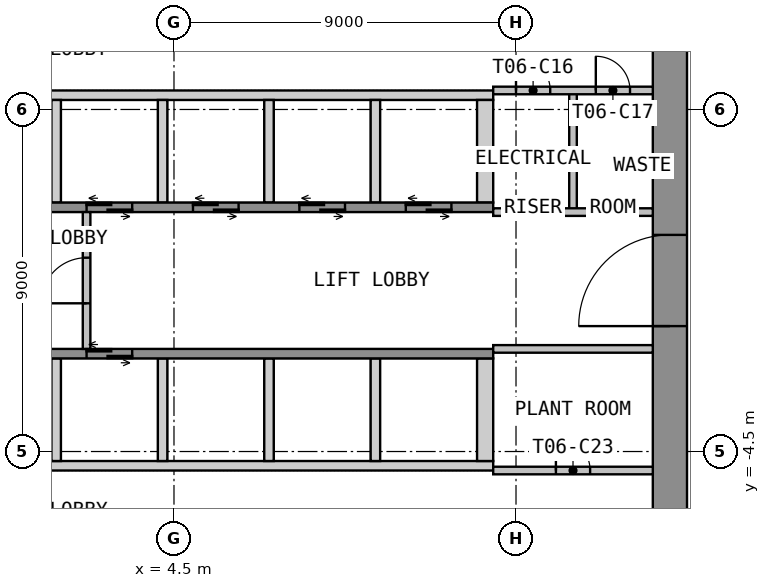
"""IFC4 building model, lengths in metres.
Left out: names, types, materials, properties, quantities, classifications, styles, units other than length and angle.
Written with IfcOpenShell. Run it as: python <this file> out.ifc"""

import sys

from ifc_helpers import new_model, si_unit, direction, frame, frame_2d, origin, place, context, subcontext, project, spatial, polyline, rectangle, outline, extrude, element, fill, save


model = new_model("IFC4")
c1 = context("Model", 3, precision=1e-05, world=origin(), true_north=direction((0.0, 1.0)))
c2 = subcontext(c1, "Body", "Model", "MODEL_VIEW")
j1 = project(units=[si_unit("LENGTHUNIT", "METRE"), si_unit("PLANEANGLEUNIT", "RADIAN")], contexts=[c1])
p1 = place(None, origin())
s1 = spatial("IfcSite", under=j1, at=p1, CompositionType="ELEMENT")
p2 = place(p1, origin())
s2 = spatial("IfcBuilding", under=s1, at=p2, CompositionType="ELEMENT")
p3 = place(p2, frame((0.0, 0.0, 93.0)))
s3 = spatial("IfcBuildingStorey", under=s2, at=p3, CompositionType="ELEMENT", Elevation=93.0)
p4 = place(p3, frame((17.55, -12.6, 0.0), z_axis=(0.0, 0.0, 1.0), x_axis=(0.0, 1.0, 0.0)))
e1 = element("IfcWall", 1, at=p4, inside=s3, PredefinedType="SHEAR", context=c2, shape_type="SweptSolid", body=[
    extrude(rectangle(XDim=25.2, YDim=0.9, at=frame_2d((12.6, 0.0))), origin(), (0.0, 0.0, 1.0), 3.525),
])
p5 = place(p4, frame((11.4, 0.0, 0.0)))
e2 = element("IfcOpeningElement", 2, at=p5, cuts=e1, PredefinedType="OPENING", context=c2, shape_type="SweptSolid", body=[
    extrude(rectangle(XDim=2.4, YDim=2.1, at=frame_2d((1.2, 1.05))), frame((0.0, 0.46, 0.0), z_axis=(0.0, -1.0, 0.0), x_axis=(1.0, 0.0, 0.0)), (0.0, 0.0, 1.0), 0.92),
])
p6 = place(p3, origin())
e3 = element("IfcWall", 3, at=p6, inside=s3, PredefinedType="SHEAR", context=c2, shape_type="SweptSolid", body=[
    extrude(outline(polyline([(-12.9, 4.75), (12.9, 4.75), (12.9, 5.0), (-12.9, 5.0), (-12.9, 4.75)])), origin(), (0.0, 0.0, 1.0), 3.525),
])
p7 = place(p3, origin())
e4 = element("IfcWall", 4, at=p7, inside=s3, PredefinedType="SHEAR", context=c2, shape_type="SweptSolid", body=[
    extrude(outline(polyline([(1.275, 2.05), (1.525, 2.05), (1.525, 4.75), (1.275, 4.75), (1.275, 2.05)])), origin(), (0.0, 0.0, 1.0), 3.525),
])
p8 = place(p3, origin())
e5 = element("IfcWall", 5, at=p8, inside=s3, PredefinedType="SHEAR", context=c2, shape_type="SweptSolid", body=[
    extrude(outline(polyline([(4.075, 2.05), (4.325, 2.05), (4.325, 4.75), (4.075, 4.75), (4.075, 2.05)])), origin(), (0.0, 0.0, 1.0), 3.525),
])
p9 = place(p3, origin())
e6 = element("IfcWall", 6, at=p9, inside=s3, PredefinedType="SHEAR", context=c2, shape_type="SweptSolid", body=[
    extrude(outline(polyline([(6.875, 2.05), (7.125, 2.05), (7.125, 4.75), (6.875, 4.75), (6.875, 2.05)])), origin(), (0.0, 0.0, 1.0), 3.525),
])
p10 = place(p3, origin())
e7 = element("IfcWall", 7, at=p10, inside=s3, PredefinedType="SHEAR", context=c2, shape_type="SweptSolid", body=[
    extrude(outline(polyline([(9.675, 2.05), (9.925, 2.05), (9.925, 4.75), (9.675, 4.75), (9.675, 2.05)])), origin(), (0.0, 0.0, 1.0), 3.525),
])
p11 = place(p3, origin())
e8 = element("IfcWall", 8, at=p11, inside=s3, PredefinedType="SHEAR", context=c2, shape_type="SweptSolid", body=[
    extrude(outline(polyline([(12.475, 2.05), (12.9, 2.05), (12.9, 4.75), (12.475, 4.75), (12.475, 2.05)])), origin(), (0.0, 0.0, 1.0), 3.525),
])
p12 = place(p3, frame((-12.9, 1.925, 0.0), z_axis=(0.0, 0.0, 1.0), x_axis=(1.0, 0.0, 0.0)))
e9 = element("IfcWall", 9, at=p12, inside=s3, PredefinedType="SHEAR", context=c2, shape_type="SweptSolid", body=[
    extrude(rectangle(XDim=25.8, YDim=0.25, at=frame_2d((12.9, 0.0))), origin(), (0.0, 0.0, 1.0), 3.525),
])
p13 = place(p12, frame((9.5, 0.0, 0.0)))
e10 = element("IfcOpeningElement", 10, at=p13, cuts=e9, PredefinedType="OPENING", context=c2, shape_type="SweptSolid", body=[
    extrude(rectangle(XDim=1.2, YDim=2.1, at=frame_2d((0.6, 1.05))), frame((0.0, 0.135, 0.0), z_axis=(0.0, -1.0, 0.0), x_axis=(1.0, 0.0, 0.0)), (0.0, 0.0, 1.0), 0.27),
])
p14 = place(p12, frame((12.3, 0.0, 0.0)))
e11 = element("IfcOpeningElement", 11, at=p14, cuts=e9, PredefinedType="OPENING", context=c2, shape_type="SweptSolid", body=[
    extrude(rectangle(XDim=1.2, YDim=2.1, at=frame_2d((0.6, 1.05))), frame((0.0, 0.135, 0.0), z_axis=(0.0, -1.0, 0.0), x_axis=(1.0, 0.0, 0.0)), (0.0, 0.0, 1.0), 0.27),
])
p15 = place(p12, frame((15.1, 0.0, 0.0)))
e12 = element("IfcOpeningElement", 12, at=p15, cuts=e9, PredefinedType="OPENING", context=c2, shape_type="SweptSolid", body=[
    extrude(rectangle(XDim=1.2, YDim=2.1, at=frame_2d((0.6, 1.05))), frame((0.0, 0.135, 0.0), z_axis=(0.0, -1.0, 0.0), x_axis=(1.0, 0.0, 0.0)), (0.0, 0.0, 1.0), 0.27),
])
p16 = place(p12, frame((17.9, 0.0, 0.0)))
e13 = element("IfcOpeningElement", 13, at=p16, cuts=e9, PredefinedType="OPENING", context=c2, shape_type="SweptSolid", body=[
    extrude(rectangle(XDim=1.2, YDim=2.1, at=frame_2d((0.6, 1.05))), frame((0.0, 0.135, 0.0), z_axis=(0.0, -1.0, 0.0), x_axis=(1.0, 0.0, 0.0)), (0.0, 0.0, 1.0), 0.27),
])
p17 = place(p12, frame((20.7, 0.0, 0.0)))
e14 = element("IfcOpeningElement", 14, at=p17, cuts=e9, PredefinedType="OPENING", context=c2, shape_type="SweptSolid", body=[
    extrude(rectangle(XDim=1.2, YDim=2.1, at=frame_2d((0.6, 1.05))), frame((0.0, 0.135, 0.0), z_axis=(0.0, -1.0, 0.0), x_axis=(1.0, 0.0, 0.0)), (0.0, 0.0, 1.0), 0.27),
])
p18 = place(p12, frame((23.5, 0.0, 0.0)))
e15 = element("IfcOpeningElement", 15, at=p18, cuts=e9, PredefinedType="OPENING", context=c2, shape_type="SweptSolid", body=[
    extrude(rectangle(XDim=1.2, YDim=2.1, at=frame_2d((0.6, 1.05))), frame((0.0, 0.135, 0.0), z_axis=(0.0, -1.0, 0.0), x_axis=(1.0, 0.0, 0.0)), (0.0, 0.0, 1.0), 0.27),
])
p19 = place(p3, origin())
e16 = element("IfcWall", 16, at=p19, inside=s3, PredefinedType="SHEAR", context=c2, shape_type="SweptSolid", body=[
    extrude(outline(polyline([(-12.9, -5.0), (12.9, -5.0), (12.9, -4.75), (-12.9, -4.75), (-12.9, -5.0)])), origin(), (0.0, 0.0, 1.0), 3.525),
])
p20 = place(p3, origin())
e17 = element("IfcWall", 17, at=p20, inside=s3, PredefinedType="SHEAR", context=c2, shape_type="SweptSolid", body=[
    extrude(outline(polyline([(1.275, -4.75), (1.525, -4.75), (1.525, -2.05), (1.275, -2.05), (1.275, -4.75)])), origin(), (0.0, 0.0, 1.0), 3.525),
])
p21 = place(p3, origin())
e18 = element("IfcWall", 18, at=p21, inside=s3, PredefinedType="SHEAR", context=c2, shape_type="SweptSolid", body=[
    extrude(outline(polyline([(4.075, -4.75), (4.325, -4.75), (4.325, -2.05), (4.075, -2.05), (4.075, -4.75)])), origin(), (0.0, 0.0, 1.0), 3.525),
])
p22 = place(p3, origin())
e19 = element("IfcWall", 19, at=p22, inside=s3, PredefinedType="SHEAR", context=c2, shape_type="SweptSolid", body=[
    extrude(outline(polyline([(6.875, -4.75), (7.125, -4.75), (7.125, -2.05), (6.875, -2.05), (6.875, -4.75)])), origin(), (0.0, 0.0, 1.0), 3.525),
])
p23 = place(p3, origin())
e20 = element("IfcWall", 20, at=p23, inside=s3, PredefinedType="SHEAR", context=c2, shape_type="SweptSolid", body=[
    extrude(outline(polyline([(9.675, -4.75), (9.925, -4.75), (9.925, -2.05), (9.675, -2.05), (9.675, -4.75)])), origin(), (0.0, 0.0, 1.0), 3.525),
])
p24 = place(p3, origin())
e21 = element("IfcWall", 21, at=p24, inside=s3, PredefinedType="SHEAR", context=c2, shape_type="SweptSolid", body=[
    extrude(outline(polyline([(12.475, -4.75), (12.9, -4.75), (12.9, -2.05), (12.475, -2.05), (12.475, -4.75)])), origin(), (0.0, 0.0, 1.0), 3.525),
])
p25 = place(p3, frame((-12.9, -1.925, 0.0), z_axis=(0.0, 0.0, 1.0), x_axis=(1.0, 0.0, 0.0)))
e22 = element("IfcWall", 22, at=p25, inside=s3, PredefinedType="SHEAR", context=c2, shape_type="SweptSolid", body=[
    extrude(rectangle(XDim=25.8, YDim=0.25, at=frame_2d((12.9, 0.0))), origin(), (0.0, 0.0, 1.0), 3.525),
])
p26 = place(p25, frame((1.1, 0.0, 0.0)))
e23 = element("IfcOpeningElement", 23, at=p26, cuts=e22, PredefinedType="OPENING", context=c2, shape_type="SweptSolid", body=[
    extrude(rectangle(XDim=1.2, YDim=2.1, at=frame_2d((0.6, 1.05))), frame((0.0, 0.135, 0.0), z_axis=(0.0, -1.0, 0.0), x_axis=(1.0, 0.0, 0.0)), (0.0, 0.0, 1.0), 0.27),
])
p27 = place(p25, frame((3.9, 0.0, 0.0)))
e24 = element("IfcOpeningElement", 24, at=p27, cuts=e22, PredefinedType="OPENING", context=c2, shape_type="SweptSolid", body=[
    extrude(rectangle(XDim=1.2, YDim=2.1, at=frame_2d((0.6, 1.05))), frame((0.0, 0.135, 0.0), z_axis=(0.0, -1.0, 0.0), x_axis=(1.0, 0.0, 0.0)), (0.0, 0.0, 1.0), 0.27),
])
p28 = place(p25, frame((6.7, 0.0, 0.0)))
e25 = element("IfcOpeningElement", 25, at=p28, cuts=e22, PredefinedType="OPENING", context=c2, shape_type="SweptSolid", body=[
    extrude(rectangle(XDim=1.2, YDim=2.1, at=frame_2d((0.6, 1.05))), frame((0.0, 0.135, 0.0), z_axis=(0.0, -1.0, 0.0), x_axis=(1.0, 0.0, 0.0)), (0.0, 0.0, 1.0), 0.27),
])
p29 = place(p25, frame((9.5, 0.0, 0.0)))
e26 = element("IfcOpeningElement", 26, at=p29, cuts=e22, PredefinedType="OPENING", context=c2, shape_type="SweptSolid", body=[
    extrude(rectangle(XDim=1.2, YDim=2.1, at=frame_2d((0.6, 1.05))), frame((0.0, 0.135, 0.0), z_axis=(0.0, -1.0, 0.0), x_axis=(1.0, 0.0, 0.0)), (0.0, 0.0, 1.0), 0.27),
])
p30 = place(p25, frame((12.3, 0.0, 0.0)))
e27 = element("IfcOpeningElement", 27, at=p30, cuts=e22, PredefinedType="OPENING", context=c2, shape_type="SweptSolid", body=[
    extrude(rectangle(XDim=1.2, YDim=2.1, at=frame_2d((0.6, 1.05))), frame((0.0, 0.135, 0.0), z_axis=(0.0, -1.0, 0.0), x_axis=(1.0, 0.0, 0.0)), (0.0, 0.0, 1.0), 0.27),
])
p31 = place(p25, frame((15.1, 0.0, 0.0)))
e28 = element("IfcOpeningElement", 28, at=p31, cuts=e22, PredefinedType="OPENING", context=c2, shape_type="SweptSolid", body=[
    extrude(rectangle(XDim=1.2, YDim=2.1, at=frame_2d((0.6, 1.05))), frame((0.0, 0.135, 0.0), z_axis=(0.0, -1.0, 0.0), x_axis=(1.0, 0.0, 0.0)), (0.0, 0.0, 1.0), 0.27),
])
p32 = place(p3, frame((2.2, -1.8, 0.0), z_axis=(0.0, 0.0, 1.0), x_axis=(0.0, 1.0, 0.0)))
e29 = element("IfcWall", 29, at=p32, inside=s3, PredefinedType="PARTITIONING", context=c2, shape_type="SweptSolid", body=[
    extrude(rectangle(XDim=3.6, YDim=0.2, at=frame_2d((1.8, 0.0))), origin(), (0.0, 0.0, 1.0), 3.525),
])
p33 = place(p32, frame((1.2, 0.0, 0.0)))
e30 = element("IfcOpeningElement", 30, at=p33, cuts=e29, PredefinedType="OPENING", context=c2, shape_type="SweptSolid", body=[
    extrude(rectangle(XDim=1.2, YDim=2.1, at=frame_2d((0.6, 1.05))), frame((0.0, 0.11, 0.0), z_axis=(0.0, -1.0, 0.0), x_axis=(1.0, 0.0, 0.0)), (0.0, 0.0, 1.0), 0.22),
])
p34 = place(p3, frame((15.0, 1.8, 0.0), z_axis=(0.0, 0.0, 1.0), x_axis=(0.0, 1.0, 0.0)))
e31 = element("IfcWall", 31, at=p34, inside=s3, PredefinedType="PARTITIONING", context=c2, shape_type="SweptSolid", body=[
    extrude(rectangle(XDim=3.2, YDim=0.2, at=frame_2d((1.6, 0.0))), origin(), (0.0, 0.0, 1.0), 3.525),
])
p35 = place(p3, frame((12.9, 5.0, 0.0), z_axis=(0.0, 0.0, 1.0), x_axis=(1.0, 0.0, 0.0)))
e32 = element("IfcWall", 32, at=p35, inside=s3, PredefinedType="PARTITIONING", context=c2, shape_type="SweptSolid", body=[
    extrude(rectangle(XDim=4.2, YDim=0.2, at=frame_2d((2.1, 0.0))), origin(), (0.0, 0.0, 1.0), 3.525),
])
p36 = place(p35, frame((0.6, 0.0, 0.0)))
e33 = element("IfcOpeningElement", 33, at=p36, cuts=e32, PredefinedType="OPENING", context=c2, shape_type="SweptSolid", body=[
    extrude(rectangle(XDim=0.9, YDim=2.1, at=frame_2d((0.45, 1.05))), frame((0.0, 0.11, 0.0), z_axis=(0.0, -1.0, 0.0), x_axis=(1.0, 0.0, 0.0)), (0.0, 0.0, 1.0), 0.22),
])
p37 = place(p35, frame((2.7, 0.0, 0.0)))
e34 = element("IfcOpeningElement", 34, at=p37, cuts=e32, PredefinedType="OPENING", context=c2, shape_type="SweptSolid", body=[
    extrude(rectangle(XDim=0.9, YDim=2.1, at=frame_2d((0.45, 1.05))), frame((0.0, 0.11, 0.0), z_axis=(0.0, -1.0, 0.0), x_axis=(1.0, 0.0, 0.0)), (0.0, 0.0, 1.0), 0.22),
])
p38 = place(p3, frame((12.9, 1.8, 0.0), z_axis=(0.0, 0.0, 1.0), x_axis=(1.0, 0.0, 0.0)))
e35 = element("IfcWall", 35, at=p38, inside=s3, PredefinedType="PARTITIONING", context=c2, shape_type="SweptSolid", body=[
    extrude(rectangle(XDim=4.2, YDim=0.2, at=frame_2d((2.1, 0.0))), origin(), (0.0, 0.0, 1.0), 3.525),
])
p39 = place(p3, frame((12.9, -5.0, 0.0), z_axis=(0.0, 0.0, 1.0), x_axis=(1.0, 0.0, 0.0)))
e36 = element("IfcWall", 36, at=p39, inside=s3, PredefinedType="PARTITIONING", context=c2, shape_type="SweptSolid", body=[
    extrude(rectangle(XDim=4.2, YDim=0.2, at=frame_2d((2.1, 0.0))), origin(), (0.0, 0.0, 1.0), 3.525),
])
p40 = place(p39, frame((1.65, 0.0, 0.0)))
e37 = element("IfcOpeningElement", 37, at=p40, cuts=e36, PredefinedType="OPENING", context=c2, shape_type="SweptSolid", body=[
    extrude(rectangle(XDim=0.9, YDim=2.1, at=frame_2d((0.45, 1.05))), frame((0.0, 0.11, 0.0), z_axis=(0.0, -1.0, 0.0), x_axis=(1.0, 0.0, 0.0)), (0.0, 0.0, 1.0), 0.22),
])
p41 = place(p3, frame((12.9, -1.8, 0.0), z_axis=(0.0, 0.0, 1.0), x_axis=(1.0, 0.0, 0.0)))
e38 = element("IfcWall", 38, at=p41, inside=s3, PredefinedType="PARTITIONING", context=c2, shape_type="SweptSolid", body=[
    extrude(rectangle(XDim=4.2, YDim=0.2, at=frame_2d((2.1, 0.0))), origin(), (0.0, 0.0, 1.0), 3.525),
])
p42 = place(p5, origin())
e39 = element("IfcDoor", 39, at=p42, inside=s3, OperationType="DOUBLE_DOOR_DOUBLE_SWING", PredefinedType="DOOR", context=c2, shape_type="SweptSolid", body=[
    extrude(rectangle(XDim=2.4, YDim=2.1, at=frame_2d((1.2, 1.05))), frame((0.0, 0.025, 0.0), z_axis=(0.0, -1.0, 0.0), x_axis=(1.0, 0.0, 0.0)), (0.0, 0.0, 1.0), 0.05),
])
fill(e2, e39)
p43 = place(p15, origin())
e40 = element("IfcDoor", 40, at=p43, inside=s3, OperationType="DOUBLE_DOOR_SLIDING", PredefinedType="DOOR", context=c2, shape_type="SweptSolid", body=[
    extrude(rectangle(XDim=1.2, YDim=2.1, at=frame_2d((0.6, 1.05))), frame((0.0, 0.025, 0.0), z_axis=(0.0, -1.0, 0.0), x_axis=(1.0, 0.0, 0.0)), (0.0, 0.0, 1.0), 0.05),
])
fill(e12, e40)
p44 = place(p16, origin())
e41 = element("IfcDoor", 41, at=p44, inside=s3, OperationType="DOUBLE_DOOR_SLIDING", PredefinedType="DOOR", context=c2, shape_type="SweptSolid", body=[
    extrude(rectangle(XDim=1.2, YDim=2.1, at=frame_2d((0.6, 1.05))), frame((0.0, 0.025, 0.0), z_axis=(0.0, -1.0, 0.0), x_axis=(1.0, 0.0, 0.0)), (0.0, 0.0, 1.0), 0.05),
])
fill(e13, e41)
p45 = place(p17, origin())
e42 = element("IfcDoor", 42, at=p45, inside=s3, OperationType="DOUBLE_DOOR_SLIDING", PredefinedType="DOOR", context=c2, shape_type="SweptSolid", body=[
    extrude(rectangle(XDim=1.2, YDim=2.1, at=frame_2d((0.6, 1.05))), frame((0.0, 0.025, 0.0), z_axis=(0.0, -1.0, 0.0), x_axis=(1.0, 0.0, 0.0)), (0.0, 0.0, 1.0), 0.05),
])
fill(e14, e42)
p46 = place(p18, origin())
e43 = element("IfcDoor", 43, at=p46, inside=s3, OperationType="DOUBLE_DOOR_SLIDING", PredefinedType="DOOR", context=c2, shape_type="SweptSolid", body=[
    extrude(rectangle(XDim=1.2, YDim=2.1, at=frame_2d((0.6, 1.05))), frame((0.0, 0.025, 0.0), z_axis=(0.0, -1.0, 0.0), x_axis=(1.0, 0.0, 0.0)), (0.0, 0.0, 1.0), 0.05),
])
fill(e15, e43)
p47 = place(p31, origin())
e44 = element("IfcDoor", 44, at=p47, inside=s3, OperationType="DOUBLE_DOOR_SLIDING", PredefinedType="DOOR", context=c2, shape_type="SweptSolid", body=[
    extrude(rectangle(XDim=1.2, YDim=2.1, at=frame_2d((0.6, 1.05))), frame((0.0, 0.025, 0.0), z_axis=(0.0, -1.0, 0.0), x_axis=(1.0, 0.0, 0.0)), (0.0, 0.0, 1.0), 0.05),
])
fill(e28, e44)
p48 = place(p33, origin())
e45 = element("IfcDoor", 45, at=p48, inside=s3, OperationType="SINGLE_SWING_LEFT", PredefinedType="DOOR", context=c2, shape_type="SweptSolid", body=[
    extrude(rectangle(XDim=1.2, YDim=2.1, at=frame_2d((0.6, 1.05))), frame((0.0, 0.025, 0.0), z_axis=(0.0, -1.0, 0.0), x_axis=(1.0, 0.0, 0.0)), (0.0, 0.0, 1.0), 0.05),
])
fill(e30, e45)
p49 = place(p36, origin())
e46 = element("IfcDoor", 46, at=p49, inside=s3, OperationType="SINGLE_SWING_LEFT", PredefinedType="DOOR", context=c2, shape_type="SweptSolid", body=[
    extrude(rectangle(XDim=0.9, YDim=2.1, at=frame_2d((0.45, 1.05))), frame((0.0, 0.025, 0.0), z_axis=(0.0, -1.0, 0.0), x_axis=(1.0, 0.0, 0.0)), (0.0, 0.0, 1.0), 0.05),
])
fill(e33, e46)
p50 = place(p37, origin())
e47 = element("IfcDoor", 47, at=p50, inside=s3, OperationType="SINGLE_SWING_LEFT", PredefinedType="DOOR", context=c2, shape_type="SweptSolid", body=[
    extrude(rectangle(XDim=0.9, YDim=2.1, at=frame_2d((0.45, 1.05))), frame((0.0, 0.025, 0.0), z_axis=(0.0, -1.0, 0.0), x_axis=(1.0, 0.0, 0.0)), (0.0, 0.0, 1.0), 0.05),
])
fill(e34, e47)
p51 = place(p40, origin())
e48 = element("IfcDoor", 48, at=p51, inside=s3, OperationType="SINGLE_SWING_LEFT", PredefinedType="DOOR", context=c2, shape_type="SweptSolid", body=[
    extrude(rectangle(XDim=0.9, YDim=2.1, at=frame_2d((0.45, 1.05))), frame((0.0, 0.025, 0.0), z_axis=(0.0, -1.0, 0.0), x_axis=(1.0, 0.0, 0.0)), (0.0, 0.0, 1.0), 0.05),
])
fill(e37, e48)
save(model, sys.argv[1])
